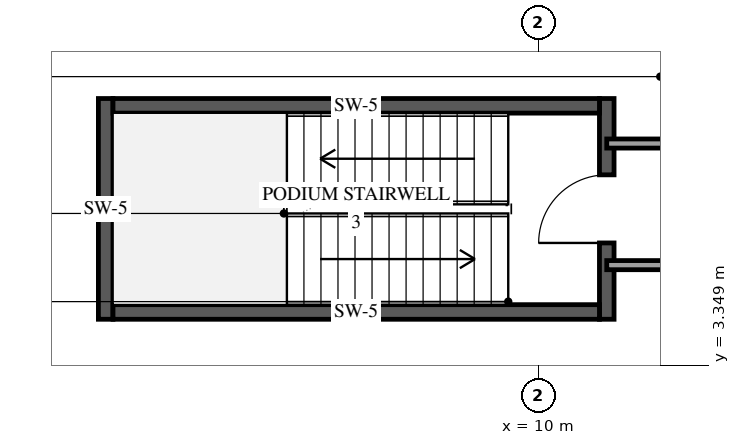
"""IFC4 building model, lengths in metres.
Left out: names, types, materials, properties, quantities, classifications, styles, units other than length and angle.
Written with IfcOpenShell. Run it as: python <this file> out.ifc"""

import sys

from ifc_helpers import new_model, si_unit, direction, frame, frame_2d, origin, place, context, subcontext, project, spatial, rectangle, extrude, element, fill, save


model = new_model("IFC4")
c1 = context("Model", 3, precision=1e-05, world=origin(), true_north=direction((0.0, 1.0)))
c2 = subcontext(c1, "Body", "Model", "MODEL_VIEW")
j1 = project(units=[si_unit("LENGTHUNIT", "METRE"), si_unit("PLANEANGLEUNIT", "RADIAN")], contexts=[c1])
p1 = place(None, origin())
s1 = spatial("IfcSite", under=j1, at=p1, CompositionType="ELEMENT")
p2 = place(p1, origin())
s2 = spatial("IfcBuilding", under=s1, at=p2, CompositionType="ELEMENT")
p3 = place(p2, frame((0.0, 0.0, 11.4)))
s3 = spatial("IfcBuildingStorey", under=s2, at=p3, CompositionType="ELEMENT", Elevation=11.4)
p4 = place(p3, frame((2.88, 4.11, 0.0), z_axis=(0.0, 0.0, 1.0), x_axis=(0.0, 1.0, 0.0)))
e1 = element("IfcWall", 1, at=p4, inside=s3, PredefinedType="SHEAR", context=c2, shape_type="SweptSolid", body=[
    extrude(rectangle(XDim=3.63, YDim=0.24, at=frame_2d((1.815, 0.0))), origin(), (0.0, 0.0, 1.0), 4.8),
])
p5 = place(p3, frame((11.12, 4.11, 0.0), z_axis=(0.0, 0.0, 1.0), x_axis=(0.0, 1.0, 0.0)))
e2 = element("IfcWall", 2, at=p5, inside=s3, PredefinedType="SHEAR", context=c2, shape_type="SweptSolid", body=[
    extrude(rectangle(XDim=3.63, YDim=0.24, at=frame_2d((1.815, 0.0))), origin(), (0.0, 0.0, 1.0), 4.8),
])
p6 = place(p5, frame((1.255, 0.0, 0.0)))
e3 = element("IfcOpeningElement", 3, at=p6, cuts=e2, PredefinedType="OPENING", context=c2, shape_type="SweptSolid", body=[
    extrude(rectangle(XDim=1.12, YDim=2.15, at=frame_2d((0.56, 1.075))), frame((0.0, 0.13, 0.0), z_axis=(0.0, -1.0, 0.0), x_axis=(1.0, 0.0, 0.0)), (0.0, 0.0, 1.0), 0.26),
])
for number, where, z_axis, x_axis in (
    (4, (3.0, 4.23, 0.0), (0.0, 0.0, 1.0), (1.0, 0.0, 0.0)),
    (5, (3.0, 7.62, 0.0), (0.0, 0.0, 1.0), (1.0, 0.0, 0.0)),
):
    element("IfcWall", number, at=place(p3, frame(where, z_axis=z_axis, x_axis=x_axis)), inside=s3, PredefinedType="SHEAR", context=c2, shape_type="SweptSolid", body=[
        extrude(rectangle(XDim=8.0, YDim=0.24, at=frame_2d((4.0, 0.0))), origin(), (0.0, 0.0, 1.0), 4.8),
    ])
p7 = place(p3, frame((46.73, 5.0, 0.0), z_axis=(0.0, 0.0, 1.0), x_axis=(-1.0, 0.0, 0.0)))
e6 = element("IfcWall", 6, at=p7, inside=s3, PredefinedType="PARTITIONING", context=c2, shape_type="SweptSolid", body=[
    extrude(rectangle(XDim=35.61, YDim=0.15, at=frame_2d((17.805, 0.0))), origin(), (0.0, 0.0, 1.0), 4.48),
])
p8 = place(p7, frame((17.33, 0.0, 0.0)))
e7 = element("IfcOpeningElement", 7, at=p8, cuts=e6, PredefinedType="OPENING", context=c2, shape_type="SweptSolid", body=[
    extrude(rectangle(XDim=0.92, YDim=2.12, at=frame_2d((0.46, 1.06))), frame((0.0, 0.085, 0.0), z_axis=(0.0, -1.0, 0.0), x_axis=(1.0, 0.0, 0.0)), (0.0, 0.0, 1.0), 0.17),
])
p9 = place(p3, frame((11.12, 7.0, 0.0), z_axis=(0.0, 0.0, 1.0), x_axis=(1.0, 0.0, 0.0)))
e8 = element("IfcWall", 8, at=p9, inside=s3, PredefinedType="PARTITIONING", context=c2, shape_type="SweptSolid", body=[
    extrude(rectangle(XDim=19.41, YDim=0.15, at=frame_2d((9.705, 0.0))), origin(), (0.0, 0.0, 1.0), 4.48),
])
p10 = place(p6, origin())
e9 = element("IfcDoor", 9, at=p10, inside=s3, OperationType="SINGLE_SWING_LEFT", PredefinedType="DOOR", context=c2, shape_type="SweptSolid", body=[
    extrude(rectangle(XDim=1.12, YDim=2.15, at=frame_2d((0.56, 1.075))), frame((0.0, 0.025, 0.0), z_axis=(0.0, -1.0, 0.0), x_axis=(1.0, 0.0, 0.0)), (0.0, 0.0, 1.0), 0.05),
])
fill(e3, e9)
save(model, sys.argv[1])
